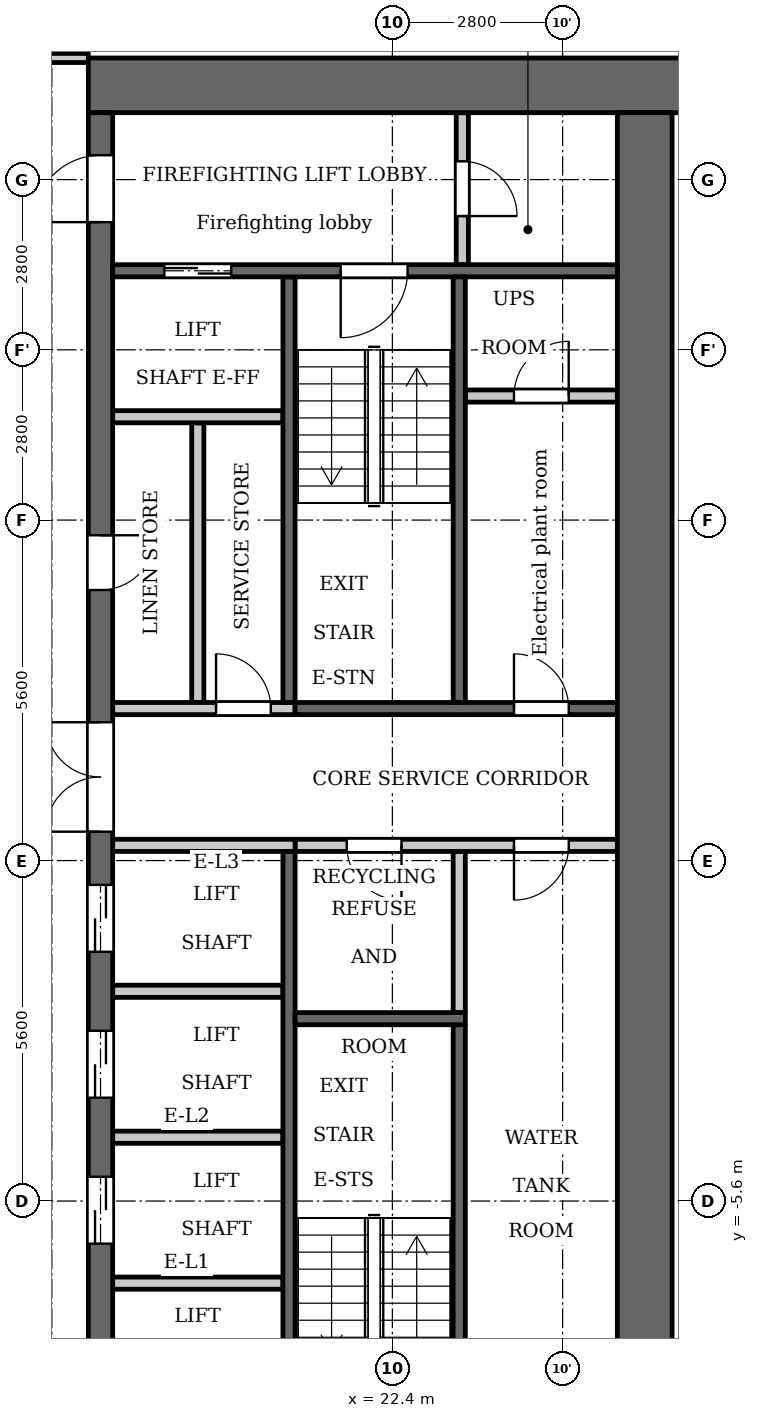
"""IFC4 building model, lengths in metres.
Left out: names, types, materials, properties, quantities, classifications, styles, units other than length and angle.
Written with IfcOpenShell. Run it as: python <this file> out.ifc"""

import sys

from ifc_helpers import new_model, si_unit, direction, frame, frame_2d, origin, place, context, subcontext, project, spatial, rectangle, extrude, element, fill, save


model = new_model("IFC4")
c1 = context("Model", 3, precision=1e-05, world=origin(), true_north=direction((0.0, 1.0)))
c2 = subcontext(c1, "Body", "Model", "MODEL_VIEW")
j1 = project(units=[si_unit("LENGTHUNIT", "METRE"), si_unit("PLANEANGLEUNIT", "RADIAN")], contexts=[c1])
p1 = place(None, origin())
s1 = spatial("IfcSite", under=j1, at=p1, CompositionType="ELEMENT")
p2 = place(p1, origin())
s2 = spatial("IfcBuilding", under=s1, at=p2, CompositionType="ELEMENT")
p3 = place(p2, frame((0.0, 0.0, 65.5)))
s3 = spatial("IfcBuildingStorey", under=s2, at=p3, CompositionType="ELEMENT", Elevation=65.5)
p4 = place(p3, frame((23.5, -2.5, 0.0), z_axis=(0.0, 0.0, 1.0), x_axis=(0.0, 1.0, 0.0)))
e1 = element("IfcWall", 1, at=p4, inside=s3, PredefinedType="PARTITIONING", context=c2, shape_type="SweptSolid", body=[
    extrude(rectangle(XDim=2.65, YDim=0.2, at=frame_2d((1.325, 0.0))), origin(), (0.0, 0.0, 1.0), 3.2),
])
p5 = place(p3, frame((20.7, 2.6, 0.0), z_axis=(0.0, 0.0, 1.0), x_axis=(0.0, 1.0, 0.0)))
e2 = element("IfcWall", 2, at=p5, inside=s3, PredefinedType="SHEAR", context=c2, shape_type="SweptSolid", body=[
    extrude(rectangle(XDim=7.0, YDim=0.2, at=frame_2d((3.5, 0.0))), origin(), (0.0, 0.0, 1.0), 3.2),
])
p6 = place(p3, frame((20.7, -9.6, 0.0), z_axis=(0.0, 0.0, 1.0), x_axis=(0.0, 1.0, 0.0)))
e3 = element("IfcWall", 3, at=p6, inside=s3, PredefinedType="SHEAR", context=c2, shape_type="SweptSolid", body=[
    extrude(rectangle(XDim=9.75, YDim=0.2, at=frame_2d((4.875, 0.0))), origin(), (0.0, 0.0, 1.0), 3.2),
])
p7 = place(p3, frame((20.8, 2.5, 0.0), z_axis=(0.0, 0.0, 1.0), x_axis=(1.0, 0.0, 0.0)))
e4 = element("IfcWall", 4, at=p7, inside=s3, PredefinedType="SHEAR", context=c2, shape_type="SweptSolid", body=[
    extrude(rectangle(XDim=5.3, YDim=0.2, at=frame_2d((2.65, 0.0))), origin(), (0.0, 0.0, 1.0), 3.2),
])
p8 = place(p7, frame((3.6, 0.0, 0.0)))
e5 = element("IfcOpeningElement", 5, at=p8, cuts=e4, PredefinedType="OPENING", context=c2, shape_type="SweptSolid", body=[
    extrude(rectangle(XDim=0.9, YDim=2.1, at=frame_2d((0.45, 1.05))), frame((0.0, 0.11, 0.0), z_axis=(0.0, -1.0, 0.0), x_axis=(1.0, 0.0, 0.0)), (0.0, 0.0, 1.0), 0.22),
])
p9 = place(p3, frame((20.8, 0.25, 0.0), z_axis=(0.0, 0.0, 1.0), x_axis=(1.0, 0.0, 0.0)))
e6 = element("IfcWall", 6, at=p9, inside=s3, PredefinedType="PARTITIONING", context=c2, shape_type="SweptSolid", body=[
    extrude(rectangle(XDim=5.3, YDim=0.2, at=frame_2d((2.65, 0.0))), origin(), (0.0, 0.0, 1.0), 3.2),
])
p10 = place(p9, frame((0.85, 0.0, 0.0)))
e7 = element("IfcOpeningElement", 7, at=p10, cuts=e6, PredefinedType="OPENING", context=c2, shape_type="SweptSolid", body=[
    extrude(rectangle(XDim=0.9, YDim=2.1, at=frame_2d((0.45, 1.05))), frame((0.0, 0.11, 0.0), z_axis=(0.0, -1.0, 0.0), x_axis=(1.0, 0.0, 0.0)), (0.0, 0.0, 1.0), 0.22),
])
p11 = place(p9, frame((3.6, 0.0, 0.0)))
e8 = element("IfcOpeningElement", 8, at=p11, cuts=e6, PredefinedType="OPENING", context=c2, shape_type="SweptSolid", body=[
    extrude(rectangle(XDim=0.9, YDim=2.1, at=frame_2d((0.45, 1.05))), frame((0.0, 0.11, 0.0), z_axis=(0.0, -1.0, 0.0), x_axis=(1.0, 0.0, 0.0)), (0.0, 0.0, 1.0), 0.22),
])
p12 = place(p3, frame((17.4, 12.75, 0.0), z_axis=(0.0, 0.0, 1.0), x_axis=(1.0, 0.0, 0.0)))
e9 = element("IfcWall", 9, at=p12, inside=s3, PredefinedType="SHEAR", context=c2, shape_type="SweptSolid", body=[
    extrude(rectangle(XDim=10.4, YDim=0.9, at=frame_2d((5.2, 0.0))), origin(), (0.0, 0.0, 1.0), 3.2),
])
p13 = place(p3, frame((19.2, 2.6, 0.0), z_axis=(0.0, 0.0, 1.0), x_axis=(0.0, 1.0, 0.0)))
e10 = element("IfcWall", 10, at=p13, inside=s3, PredefinedType="PARTITIONING", context=c2, shape_type="SweptSolid", body=[
    extrude(rectangle(XDim=4.6, YDim=0.2, at=frame_2d((2.3, 0.0))), origin(), (0.0, 0.0, 1.0), 3.2),
])
p14 = place(p3, frame((17.6, -12.3, 0.0), z_axis=(0.0, 0.0, 1.0), x_axis=(0.0, 1.0, 0.0)))
e11 = element("IfcWall", 11, at=p14, inside=s3, PredefinedType="SHEAR", context=c2, shape_type="SweptSolid", body=[
    extrude(rectangle(XDim=24.6, YDim=0.4, at=frame_2d((12.3, 0.0))), origin(), (0.0, 0.0, 1.0), 3.2),
])
p15 = place(p14, frame((6.0, 0.0, 0.0)))
e12 = element("IfcOpeningElement", 12, at=p15, cuts=e11, PredefinedType="OPENING", context=c2, shape_type="SweptSolid", body=[
    extrude(rectangle(XDim=1.1, YDim=2.1, at=frame_2d((0.55, 1.05))), frame((0.0, 0.21, 0.0), z_axis=(0.0, -1.0, 0.0), x_axis=(1.0, 0.0, 0.0)), (0.0, 0.0, 1.0), 0.42),
])
p16 = place(p14, frame((8.4, 0.0, 0.0)))
e13 = element("IfcOpeningElement", 13, at=p16, cuts=e11, PredefinedType="OPENING", context=c2, shape_type="SweptSolid", body=[
    extrude(rectangle(XDim=1.1, YDim=2.1, at=frame_2d((0.55, 1.05))), frame((0.0, 0.21, 0.0), z_axis=(0.0, -1.0, 0.0), x_axis=(1.0, 0.0, 0.0)), (0.0, 0.0, 1.0), 0.42),
])
p17 = place(p14, frame((10.8, 0.0, 0.0)))
e14 = element("IfcOpeningElement", 14, at=p17, cuts=e11, PredefinedType="OPENING", context=c2, shape_type="SweptSolid", body=[
    extrude(rectangle(XDim=1.1, YDim=2.1, at=frame_2d((0.55, 1.05))), frame((0.0, 0.21, 0.0), z_axis=(0.0, -1.0, 0.0), x_axis=(1.0, 0.0, 0.0)), (0.0, 0.0, 1.0), 0.42),
])
p18 = place(p14, frame((16.75, 0.0, 0.0)))
e15 = element("IfcOpeningElement", 15, at=p18, cuts=e11, PredefinedType="OPENING", context=c2, shape_type="SweptSolid", body=[
    extrude(rectangle(XDim=0.9, YDim=2.1, at=frame_2d((0.45, 1.05))), frame((0.0, 0.21, 0.0), z_axis=(0.0, -1.0, 0.0), x_axis=(1.0, 0.0, 0.0)), (0.0, 0.0, 1.0), 0.42),
])
p19 = place(p14, frame((22.8, 0.0, 0.0)))
e16 = element("IfcOpeningElement", 16, at=p19, cuts=e11, PredefinedType="OPENING", context=c2, shape_type="SweptSolid", body=[
    extrude(rectangle(XDim=1.1, YDim=2.1, at=frame_2d((0.55, 1.05))), frame((0.0, 0.21, 0.0), z_axis=(0.0, -1.0, 0.0), x_axis=(1.0, 0.0, 0.0)), (0.0, 0.0, 1.0), 0.42),
])
p20 = place(p14, frame((0.7, 0.0, 0.0)))
e17 = element("IfcOpeningElement", 17, at=p20, cuts=e11, PredefinedType="OPENING", context=c2, shape_type="SweptSolid", body=[
    extrude(rectangle(XDim=1.1, YDim=2.1, at=frame_2d((0.55, 1.05))), frame((0.0, 0.21, 0.0), z_axis=(0.0, -1.0, 0.0), x_axis=(1.0, 0.0, 0.0)), (0.0, 0.0, 1.0), 0.42),
])
p21 = place(p14, frame((12.775, 0.0, 0.0)))
e18 = element("IfcOpeningElement", 18, at=p21, cuts=e11, PredefinedType="OPENING", context=c2, shape_type="SweptSolid", body=[
    extrude(rectangle(XDim=1.8, YDim=2.1, at=frame_2d((0.9, 1.05))), frame((0.0, 0.21, 0.0), z_axis=(0.0, -1.0, 0.0), x_axis=(1.0, 0.0, 0.0)), (0.0, 0.0, 1.0), 0.42),
])
p22 = place(p3, frame((26.55, -12.3, 0.0), z_axis=(0.0, 0.0, 1.0), x_axis=(0.0, 1.0, 0.0)))
e19 = element("IfcWall", 19, at=p22, inside=s3, PredefinedType="SHEAR", context=c2, shape_type="SweptSolid", body=[
    extrude(rectangle(XDim=24.6, YDim=0.9, at=frame_2d((12.3, 0.0))), origin(), (0.0, 0.0, 1.0), 3.2),
])
p23 = place(p3, frame((23.55, 9.8, 0.0), z_axis=(0.0, 0.0, 1.0), x_axis=(0.0, 1.0, 0.0)))
e20 = element("IfcWall", 20, at=p23, inside=s3, PredefinedType="PARTITIONING", context=c2, shape_type="SweptSolid", body=[
    extrude(rectangle(XDim=2.5, YDim=0.2, at=frame_2d((1.25, 0.0))), origin(), (0.0, 0.0, 1.0), 3.2),
])
p24 = place(p23, frame((0.8, 0.0, 0.0)))
e21 = element("IfcOpeningElement", 21, at=p24, cuts=e20, PredefinedType="OPENING", context=c2, shape_type="SweptSolid", body=[
    extrude(rectangle(XDim=0.9, YDim=2.1, at=frame_2d((0.45, 1.05))), frame((0.0, 0.11, 0.0), z_axis=(0.0, -1.0, 0.0), x_axis=(1.0, 0.0, 0.0)), (0.0, 0.0, 1.0), 0.22),
])
p25 = place(p3, frame((23.6, 7.64, 0.0), z_axis=(0.0, 0.0, 1.0), x_axis=(1.0, 0.0, 0.0)))
e22 = element("IfcWall", 22, at=p25, inside=s3, PredefinedType="PARTITIONING", context=c2, shape_type="SweptSolid", body=[
    extrude(rectangle(XDim=2.5, YDim=0.2, at=frame_2d((1.25, 0.0))), origin(), (0.0, 0.0, 1.0), 3.2),
])
p26 = place(p25, frame((0.8, 0.0, 0.0)))
e23 = element("IfcOpeningElement", 23, at=p26, cuts=e22, PredefinedType="OPENING", context=c2, shape_type="SweptSolid", body=[
    extrude(rectangle(XDim=0.9, YDim=2.1, at=frame_2d((0.45, 1.05))), frame((0.0, 0.11, 0.0), z_axis=(0.0, -1.0, 0.0), x_axis=(1.0, 0.0, 0.0)), (0.0, 0.0, 1.0), 0.22),
])
for number, where, z_axis, x_axis in (
    (24, (17.8, -6.95, 0.0), (0.0, 0.0, 1.0), (1.0, 0.0, 0.0)),
    (25, (17.8, -4.55, 0.0), (0.0, 0.0, 1.0), (1.0, 0.0, 0.0)),
    (26, (17.8, -2.15, 0.0), (0.0, 0.0, 1.0), (1.0, 0.0, 0.0)),
):
    element("IfcWall", number, at=place(p3, frame(where, z_axis=z_axis, x_axis=x_axis)), inside=s3, PredefinedType="PARTITIONING", context=c2, shape_type="SweptSolid", body=[
        extrude(rectangle(XDim=2.8, YDim=0.2, at=frame_2d((1.4, 0.0))), origin(), (0.0, 0.0, 1.0), 3.2),
    ])
p27 = place(p3, frame((17.8, 0.25, 0.0), z_axis=(0.0, 0.0, 1.0), x_axis=(1.0, 0.0, 0.0)))
e27 = element("IfcWall", 27, at=p27, inside=s3, PredefinedType="PARTITIONING", context=c2, shape_type="SweptSolid", body=[
    extrude(rectangle(XDim=3.0, YDim=0.2, at=frame_2d((1.5, 0.0))), origin(), (0.0, 0.0, 1.0), 3.2),
])
p28 = place(p3, frame((17.8, 2.5, 0.0), z_axis=(0.0, 0.0, 1.0), x_axis=(1.0, 0.0, 0.0)))
e28 = element("IfcWall", 28, at=p28, inside=s3, PredefinedType="PARTITIONING", context=c2, shape_type="SweptSolid", body=[
    extrude(rectangle(XDim=3.0, YDim=0.2, at=frame_2d((1.5, 0.0))), origin(), (0.0, 0.0, 1.0), 3.2),
])
p29 = place(p28, frame((1.7, 0.0, 0.0)))
e29 = element("IfcOpeningElement", 29, at=p29, cuts=e28, PredefinedType="OPENING", context=c2, shape_type="SweptSolid", body=[
    extrude(rectangle(XDim=0.9, YDim=2.1, at=frame_2d((0.45, 1.05))), frame((0.0, 0.11, 0.0), z_axis=(0.0, -1.0, 0.0), x_axis=(1.0, 0.0, 0.0)), (0.0, 0.0, 1.0), 0.22),
])
p30 = place(p3, frame((17.8, 7.3, 0.0), z_axis=(0.0, 0.0, 1.0), x_axis=(1.0, 0.0, 0.0)))
e30 = element("IfcWall", 30, at=p30, inside=s3, PredefinedType="PARTITIONING", context=c2, shape_type="SweptSolid", body=[
    extrude(rectangle(XDim=2.8, YDim=0.2, at=frame_2d((1.4, 0.0))), origin(), (0.0, 0.0, 1.0), 3.2),
])
p31 = place(p3, frame((17.8, 9.7, 0.0), z_axis=(0.0, 0.0, 1.0), x_axis=(1.0, 0.0, 0.0)))
e31 = element("IfcWall", 31, at=p31, inside=s3, PredefinedType="SHEAR", context=c2, shape_type="SweptSolid", body=[
    extrude(rectangle(XDim=8.3, YDim=0.2, at=frame_2d((4.15, 0.0))), origin(), (0.0, 0.0, 1.0), 3.2),
])
p32 = place(p31, frame((0.85, 0.0, 0.0)))
e32 = element("IfcOpeningElement", 32, at=p32, cuts=e31, PredefinedType="OPENING", context=c2, shape_type="SweptSolid", body=[
    extrude(rectangle(XDim=1.1, YDim=2.1, at=frame_2d((0.55, 1.05))), frame((0.0, 0.11, 0.0), z_axis=(0.0, -1.0, 0.0), x_axis=(1.0, 0.0, 0.0)), (0.0, 0.0, 1.0), 0.22),
])
p33 = place(p31, frame((3.75, 0.0, 0.0)))
e33 = element("IfcOpeningElement", 33, at=p33, cuts=e31, PredefinedType="OPENING", context=c2, shape_type="SweptSolid", body=[
    extrude(rectangle(XDim=1.1, YDim=2.1, at=frame_2d((0.55, 1.05))), frame((0.0, 0.11, 0.0), z_axis=(0.0, -1.0, 0.0), x_axis=(1.0, 0.0, 0.0)), (0.0, 0.0, 1.0), 0.22),
])
p34 = place(p3, frame((23.5, 2.6, 0.0), z_axis=(0.0, 0.0, 1.0), x_axis=(0.0, 1.0, 0.0)))
e34 = element("IfcWall", 34, at=p34, inside=s3, PredefinedType="SHEAR", context=c2, shape_type="SweptSolid", body=[
    extrude(rectangle(XDim=7.0, YDim=0.2, at=frame_2d((3.5, 0.0))), origin(), (0.0, 0.0, 1.0), 3.2),
])
p35 = place(p3, frame((23.5, -9.6, 0.0), z_axis=(0.0, 0.0, 1.0), x_axis=(0.0, 1.0, 0.0)))
e35 = element("IfcWall", 35, at=p35, inside=s3, PredefinedType="SHEAR", context=c2, shape_type="SweptSolid", body=[
    extrude(rectangle(XDim=6.9, YDim=0.2, at=frame_2d((3.45, 0.0))), origin(), (0.0, 0.0, 1.0), 3.2),
])
p36 = place(p3, frame((20.8, -2.6, 0.0), z_axis=(0.0, 0.0, 1.0), x_axis=(1.0, 0.0, 0.0)))
e36 = element("IfcWall", 36, at=p36, inside=s3, PredefinedType="SHEAR", context=c2, shape_type="SweptSolid", body=[
    extrude(rectangle(XDim=2.8, YDim=0.2, at=frame_2d((1.4, 0.0))), origin(), (0.0, 0.0, 1.0), 3.2),
])
p37 = place(p3, frame((-17.4, 13.2, 0.0), z_axis=(0.0, 0.0, 1.0), x_axis=(1.0, 0.0, 0.0)))
e37 = element("IfcWall", 37, at=p37, inside=s3, PredefinedType="PARTITIONING", context=c2, shape_type="SweptSolid", body=[
    extrude(rectangle(XDim=34.8, YDim=0.15, at=frame_2d((17.4, 0.0))), origin(), (0.0, 0.0, 1.0), 3.2),
])
p38 = place(p37, frame((0.75, 0.0, 0.0)))
e38 = element("IfcOpeningElement", 38, at=p38, cuts=e37, PredefinedType="OPENING", context=c2, shape_type="SweptSolid", body=[
    extrude(rectangle(XDim=1.0, YDim=2.1, at=frame_2d((0.5, 1.05))), frame((0.0, 0.085, 0.0), z_axis=(0.0, -1.0, 0.0), x_axis=(1.0, 0.0, 0.0)), (0.0, 0.0, 1.0), 0.17),
])
p39 = place(p37, frame((33.15, 0.0, 0.0)))
e39 = element("IfcOpeningElement", 39, at=p39, cuts=e37, PredefinedType="OPENING", context=c2, shape_type="SweptSolid", body=[
    extrude(rectangle(XDim=1.0, YDim=2.1, at=frame_2d((0.5, 1.05))), frame((0.0, 0.085, 0.0), z_axis=(0.0, -1.0, 0.0), x_axis=(1.0, 0.0, 0.0)), (0.0, 0.0, 1.0), 0.17),
])
p40 = place(p37, frame((6.85, 0.0, 0.0)))
e40 = element("IfcOpeningElement", 40, at=p40, cuts=e37, PredefinedType="OPENING", context=c2, shape_type="SweptSolid", body=[
    extrude(rectangle(XDim=1.0, YDim=2.1, at=frame_2d((0.5, 1.05))), frame((0.0, 0.085, 0.0), z_axis=(0.0, -1.0, 0.0), x_axis=(1.0, 0.0, 0.0)), (0.0, 0.0, 1.0), 0.17),
])
p41 = place(p37, frame((12.45, 0.0, 0.0)))
e41 = element("IfcOpeningElement", 41, at=p41, cuts=e37, PredefinedType="OPENING", context=c2, shape_type="SweptSolid", body=[
    extrude(rectangle(XDim=1.0, YDim=2.1, at=frame_2d((0.5, 1.05))), frame((0.0, 0.085, 0.0), z_axis=(0.0, -1.0, 0.0), x_axis=(1.0, 0.0, 0.0)), (0.0, 0.0, 1.0), 0.17),
])
p42 = place(p37, frame((23.65, 0.0, 0.0)))
e42 = element("IfcOpeningElement", 42, at=p42, cuts=e37, PredefinedType="OPENING", context=c2, shape_type="SweptSolid", body=[
    extrude(rectangle(XDim=1.0, YDim=2.1, at=frame_2d((0.5, 1.05))), frame((0.0, 0.085, 0.0), z_axis=(0.0, -1.0, 0.0), x_axis=(1.0, 0.0, 0.0)), (0.0, 0.0, 1.0), 0.17),
])
p43 = place(p15, origin())
e43 = element("IfcDoor", 43, at=p43, inside=s3, OperationType="DOUBLE_DOOR_SLIDING", PredefinedType="DOOR", context=c2, shape_type="SweptSolid", body=[
    extrude(rectangle(XDim=1.1, YDim=2.1, at=frame_2d((0.55, 1.05))), frame((0.0, 0.025, 0.0), z_axis=(0.0, -1.0, 0.0), x_axis=(1.0, 0.0, 0.0)), (0.0, 0.0, 1.0), 0.05),
])
fill(e12, e43)
p44 = place(p16, origin())
e44 = element("IfcDoor", 44, at=p44, inside=s3, OperationType="DOUBLE_DOOR_SLIDING", PredefinedType="DOOR", context=c2, shape_type="SweptSolid", body=[
    extrude(rectangle(XDim=1.1, YDim=2.1, at=frame_2d((0.55, 1.05))), frame((0.0, 0.025, 0.0), z_axis=(0.0, -1.0, 0.0), x_axis=(1.0, 0.0, 0.0)), (0.0, 0.0, 1.0), 0.05),
])
fill(e13, e44)
p45 = place(p17, origin())
e45 = element("IfcDoor", 45, at=p45, inside=s3, OperationType="DOUBLE_DOOR_SLIDING", PredefinedType="DOOR", context=c2, shape_type="SweptSolid", body=[
    extrude(rectangle(XDim=1.1, YDim=2.1, at=frame_2d((0.55, 1.05))), frame((0.0, 0.025, 0.0), z_axis=(0.0, -1.0, 0.0), x_axis=(1.0, 0.0, 0.0)), (0.0, 0.0, 1.0), 0.05),
])
fill(e14, e45)
p46 = place(p18, origin())
e46 = element("IfcDoor", 46, at=p46, inside=s3, OperationType="SINGLE_SWING_RIGHT", PredefinedType="DOOR", context=c2, shape_type="SweptSolid", body=[
    extrude(rectangle(XDim=0.9, YDim=2.1, at=frame_2d((0.45, 1.05))), frame((0.0, 0.025, 0.0), z_axis=(0.0, -1.0, 0.0), x_axis=(1.0, 0.0, 0.0)), (0.0, 0.0, 1.0), 0.05),
])
fill(e15, e46)
p47 = place(p29, origin())
e47 = element("IfcDoor", 47, at=p47, inside=s3, OperationType="SINGLE_SWING_RIGHT", PredefinedType="DOOR", context=c2, shape_type="SweptSolid", body=[
    extrude(rectangle(XDim=0.9, YDim=2.1, at=frame_2d((0.45, 1.05))), frame((0.0, 0.025, 0.0), z_axis=(0.0, -1.0, 0.0), x_axis=(1.0, 0.0, 0.0)), (0.0, 0.0, 1.0), 0.05),
])
fill(e29, e47)
p48 = place(p32, origin())
e48 = element("IfcDoor", 48, at=p48, inside=s3, OperationType="DOUBLE_DOOR_SLIDING", PredefinedType="DOOR", context=c2, shape_type="SweptSolid", body=[
    extrude(rectangle(XDim=1.1, YDim=2.1, at=frame_2d((0.55, 1.05))), frame((0.0, 0.025, 0.0), z_axis=(0.0, -1.0, 0.0), x_axis=(1.0, 0.0, 0.0)), (0.0, 0.0, 1.0), 0.05),
])
fill(e32, e48)
p49 = place(p19, origin())
e49 = element("IfcDoor", 49, at=p49, inside=s3, OperationType="SINGLE_SWING_RIGHT", PredefinedType="DOOR", context=c2, shape_type="SweptSolid", body=[
    extrude(rectangle(XDim=1.1, YDim=2.1, at=frame_2d((0.55, 1.05))), frame((0.0, 0.025, 0.0), z_axis=(0.0, -1.0, 0.0), x_axis=(1.0, 0.0, 0.0)), (0.0, 0.0, 1.0), 0.05),
])
fill(e16, e49)
p50 = place(p24, origin())
e50 = element("IfcDoor", 50, at=p50, inside=s3, OperationType="SINGLE_SWING_LEFT", PredefinedType="DOOR", context=c2, shape_type="SweptSolid", body=[
    extrude(rectangle(XDim=0.9, YDim=2.1, at=frame_2d((0.45, 1.05))), frame((0.0, 0.025, 0.0), z_axis=(0.0, -1.0, 0.0), x_axis=(1.0, 0.0, 0.0)), (0.0, 0.0, 1.0), 0.05),
])
fill(e21, e50)
p51 = place(p33, origin())
e51 = element("IfcDoor", 51, at=p51, inside=s3, OperationType="SINGLE_SWING_LEFT", PredefinedType="DOOR", context=c2, shape_type="SweptSolid", body=[
    extrude(rectangle(XDim=1.1, YDim=2.1, at=frame_2d((0.55, 1.05))), frame((0.0, 0.025, 0.0), z_axis=(0.0, -1.0, 0.0), x_axis=(1.0, 0.0, 0.0)), (0.0, 0.0, 1.0), 0.05),
])
fill(e33, e51)
p52 = place(p21, origin())
e52 = element("IfcDoor", 52, at=p52, inside=s3, OperationType="DOUBLE_DOOR_SINGLE_SWING", PredefinedType="DOOR", context=c2, shape_type="SweptSolid", body=[
    extrude(rectangle(XDim=1.8, YDim=2.1, at=frame_2d((0.9, 1.05))), frame((0.0, 0.025, 0.0), z_axis=(0.0, -1.0, 0.0), x_axis=(1.0, 0.0, 0.0)), (0.0, 0.0, 1.0), 0.05),
])
fill(e18, e52)
p53 = place(p10, origin())
e53 = element("IfcDoor", 53, at=p53, inside=s3, OperationType="SINGLE_SWING_RIGHT", PredefinedType="DOOR", context=c2, shape_type="SweptSolid", body=[
    extrude(rectangle(XDim=0.9, YDim=2.1, at=frame_2d((0.45, 1.05))), frame((0.0, 0.025, 0.0), z_axis=(0.0, -1.0, 0.0), x_axis=(1.0, 0.0, 0.0)), (0.0, 0.0, 1.0), 0.05),
])
fill(e7, e53)
p54 = place(p11, origin())
e54 = element("IfcDoor", 54, at=p54, inside=s3, OperationType="SINGLE_SWING_LEFT", PredefinedType="DOOR", context=c2, shape_type="SweptSolid", body=[
    extrude(rectangle(XDim=0.9, YDim=2.1, at=frame_2d((0.45, 1.05))), frame((0.0, 0.025, 0.0), z_axis=(0.0, -1.0, 0.0), x_axis=(1.0, 0.0, 0.0)), (0.0, 0.0, 1.0), 0.05),
])
fill(e8, e54)
p55 = place(p26, origin())
e55 = element("IfcDoor", 55, at=p55, inside=s3, OperationType="SINGLE_SWING_LEFT", PredefinedType="DOOR", context=c2, shape_type="SweptSolid", body=[
    extrude(rectangle(XDim=0.9, YDim=2.1, at=frame_2d((0.45, 1.05))), frame((0.0, 0.025, 0.0), z_axis=(0.0, -1.0, 0.0), x_axis=(1.0, 0.0, 0.0)), (0.0, 0.0, 1.0), 0.05),
])
fill(e23, e55)
p56 = place(p8, origin())
e56 = element("IfcDoor", 56, at=p56, inside=s3, OperationType="SINGLE_SWING_RIGHT", PredefinedType="DOOR", context=c2, shape_type="SweptSolid", body=[
    extrude(rectangle(XDim=0.9, YDim=2.1, at=frame_2d((0.45, 1.05))), frame((0.0, 0.025, 0.0), z_axis=(0.0, -1.0, 0.0), x_axis=(1.0, 0.0, 0.0)), (0.0, 0.0, 1.0), 0.05),
])
fill(e5, e56)
save(model, sys.argv[1])
